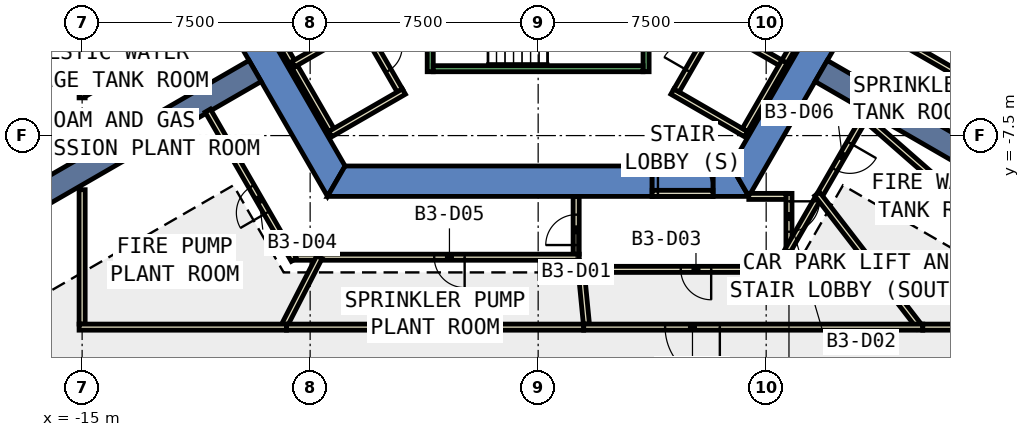
"""IFC4 building model, lengths in metres.
Left out: names, types, materials, properties, quantities, classifications, styles, units other than length and angle.
Written with IfcOpenShell. Run it as: python <this file> out.ifc"""

import sys

from ifc_helpers import new_model, si_unit, direction, frame, frame_2d, origin, place, context, subcontext, project, spatial, polyline, rectangle, outline, extrude, element, fill, save


model = new_model("IFC4")
c1 = context("Model", 3, precision=1e-05, world=origin(), true_north=direction((0.0, 1.0)))
c2 = subcontext(c1, "Body", "Model", "MODEL_VIEW")
j1 = project(units=[si_unit("LENGTHUNIT", "METRE"), si_unit("PLANEANGLEUNIT", "RADIAN")], contexts=[c1])
p1 = place(None, origin())
s1 = spatial("IfcSite", under=j1, at=p1, CompositionType="ELEMENT")
p2 = place(p1, origin())
s2 = spatial("IfcBuilding", under=s1, at=p2, CompositionType="ELEMENT")
p3 = place(p2, frame((0.0, 0.0, -16.5)))
s3 = spatial("IfcBuildingStorey", under=s2, at=p3, CompositionType="ELEMENT", Elevation=-16.5)
p4 = place(p3, origin())
e1 = element("IfcWall", 1, at=p4, inside=s3, PredefinedType="SHEAR", context=c2, shape_type="SweptSolid", body=[
    extrude(outline(polyline([(-13.856, 2.5), (-6.928, -9.5), (-6.351, -8.5), (-12.702, 2.5), (-13.856, 2.5)])), origin(), (0.0, 0.0, 1.0), 5.08),
])
p5 = place(p3, origin())
e2 = element("IfcWall", 2, at=p5, inside=s3, PredefinedType="SHEAR", context=c2, shape_type="SweptSolid", body=[
    extrude(outline(polyline([(3.75, -9.5), (3.75, -8.5), (-6.351, -8.5), (-6.928, -9.5), (3.75, -9.5)])), origin(), (0.0, 0.0, 1.0), 5.08),
])
p6 = place(p3, origin())
e3 = element("IfcWall", 3, at=p6, inside=s3, PredefinedType="SHEAR", context=c2, shape_type="SweptSolid", body=[
    extrude(outline(polyline([(5.75, -8.5), (5.75, -9.5), (6.928, -9.5), (6.351, -8.5), (5.75, -8.5)])), origin(), (0.0, 0.0, 1.0), 5.08),
])
p7 = place(p3, frame((0.0, 0.0, 3.6)))
e4 = element("IfcWall", 4, at=p7, inside=s3, PredefinedType="SHEAR", context=c2, shape_type="SweptSolid", body=[
    extrude(outline(polyline([(5.75, -9.5), (5.75, -8.5), (3.75, -8.5), (3.75, -9.5), (5.75, -9.5)])), origin(), (0.0, 0.0, 1.0), 1.48),
])
p8 = place(p3, origin())
e5 = element("IfcWall", 5, at=p8, inside=s3, PredefinedType="SHEAR", context=c2, shape_type="SweptSolid", body=[
    extrude(outline(polyline([(6.928, -9.5), (13.856, 2.5), (12.702, 2.5), (6.351, -8.5), (6.928, -9.5)])), origin(), (0.0, 0.0, 1.0), 5.08),
])
for number, where, z_axis, x_axis in (
    (6, (9.31, -5.375, 0.0), (0.0, 0.0, 1.0), (0.866, -0.5, 0.0)),
    (7, (-9.31, -5.375, 0.0), (0.0, 0.0, 1.0), (-0.866, -0.5, 0.0)),
):
    element("IfcWall", number, at=place(p3, frame(where, z_axis=z_axis, x_axis=x_axis)), inside=s3, PredefinedType="SHEAR", context=c2, shape_type="SweptSolid", body=[
        extrude(rectangle(XDim=9.0, YDim=0.8, at=frame_2d((4.5, 0.0))), origin(), (0.0, 0.0, 1.0), 5.08),
    ])
p9 = place(p3, frame((1.25, -11.4, 0.0), z_axis=(0.0, 0.0, 1.0), x_axis=(0.0, 1.0, 0.0)))
e8 = element("IfcWall", 8, at=p9, inside=s3, PredefinedType="PARTITIONING", context=c2, shape_type="SweptSolid", body=[
    extrude(rectangle(XDim=1.9, YDim=0.2, at=frame_2d((0.95, 0.0))), origin(), (0.0, 0.0, 1.0), 5.08),
])
p10 = place(p9, frame((0.3, 0.0, 0.0)))
e9 = element("IfcOpeningElement", 9, at=p10, cuts=e8, PredefinedType="OPENING", context=c2, shape_type="SweptSolid", body=[
    extrude(rectangle(XDim=1.0, YDim=2.1, at=frame_2d((0.5, 1.05))), frame((0.0, 0.11, 0.0), z_axis=(0.0, -1.0, 0.0), x_axis=(1.0, 0.0, 0.0)), (0.0, 0.0, 1.0), 0.22),
])
p11 = place(p3, frame((8.25, -9.4, 0.0), z_axis=(0.0, 0.0, 1.0), x_axis=(0.0, -1.0, 0.0)))
e10 = element("IfcWall", 10, at=p11, inside=s3, PredefinedType="PARTITIONING", context=c2, shape_type="SweptSolid", body=[
    extrude(rectangle(XDim=1.71, YDim=0.2, at=frame_2d((0.855, 0.0))), origin(), (0.0, 0.0, 1.0), 5.08),
])
p12 = place(p11, frame((0.262, 0.0, 0.0)))
e11 = element("IfcOpeningElement", 11, at=p12, cuts=e10, PredefinedType="OPENING", context=c2, shape_type="SweptSolid", body=[
    extrude(rectangle(XDim=1.0, YDim=2.1, at=frame_2d((0.5, 1.05))), frame((0.0, 0.11, 0.0), z_axis=(0.0, -1.0, 0.0), x_axis=(1.0, 0.0, 0.0)), (0.0, 0.0, 1.0), 0.22),
])
p13 = place(p3, frame((6.928, -9.5, 0.0), z_axis=(0.0, 0.0, 1.0), x_axis=(1.0, 0.0, 0.0)))
e12 = element("IfcWall", 12, at=p13, inside=s3, PredefinedType="PARTITIONING", context=c2, shape_type="SweptSolid", body=[
    extrude(rectangle(XDim=1.222, YDim=0.2, at=frame_2d((0.611, 0.0))), origin(), (0.0, 0.0, 1.0), 5.08),
])
p14 = place(p3, frame((8.25, -11.31, 0.0), z_axis=(0.0, 0.0, 1.0), x_axis=(0.0, -1.0, 0.0)))
e13 = element("IfcWall", 13, at=p14, inside=s3, PredefinedType="PARTITIONING", context=c2, shape_type="SweptSolid", body=[
    extrude(rectangle(XDim=0.49, YDim=0.2, at=frame_2d((0.245, 0.0))), origin(), (0.0, 0.0, 1.0), 5.08),
])
p15 = place(p3, frame((8.35, -11.9, 0.0), z_axis=(0.0, 0.0, 1.0), x_axis=(-1.0, 0.0, 0.0)))
e14 = element("IfcWall", 14, at=p15, inside=s3, PredefinedType="PARTITIONING", context=c2, shape_type="SweptSolid", body=[
    extrude(rectangle(XDim=7.039, YDim=0.2, at=frame_2d((3.52, 0.0))), origin(), (0.0, 0.0, 1.0), 5.08),
])
p16 = place(p15, frame((2.659, 0.0, 0.0)))
e15 = element("IfcOpeningElement", 15, at=p16, cuts=e14, PredefinedType="OPENING", context=c2, shape_type="SweptSolid", body=[
    extrude(rectangle(XDim=1.0, YDim=2.1, at=frame_2d((0.5, 1.05))), frame((0.0, 0.11, 0.0), z_axis=(0.0, -1.0, 0.0), x_axis=(1.0, 0.0, 0.0)), (0.0, 0.0, 1.0), 0.22),
])
p17 = place(p3, frame((1.25, -12.0, 0.0), z_axis=(0.0, 0.0, 1.0), x_axis=(0.0, 1.0, 0.0)))
e16 = element("IfcWall", 16, at=p17, inside=s3, PredefinedType="PARTITIONING", context=c2, shape_type="SweptSolid", body=[
    extrude(rectangle(XDim=0.4, YDim=0.2, at=frame_2d((0.2, 0.0))), origin(), (0.0, 0.0, 1.0), 5.08),
])
p18 = place(p3, frame((-7.296, -11.5, 0.0), z_axis=(0.0, 0.0, 1.0), x_axis=(-1.0, 0.0, 0.0)))
e17 = element("IfcWall", 17, at=p18, inside=s3, PredefinedType="PARTITIONING", context=c2, shape_type="SweptSolid", body=[
    extrude(rectangle(XDim=0.687, YDim=0.2, at=frame_2d((0.344, 0.0))), origin(), (0.0, 0.0, 1.0), 5.08),
])
p19 = place(p3, frame((-8.033, -11.587, 0.0), z_axis=(0.0, 0.0, 1.0), x_axis=(-0.499974742752, 0.866039985572, 0.0)))
e18 = element("IfcWall", 18, at=p19, inside=s3, PredefinedType="PARTITIONING", context=c2, shape_type="SweptSolid", body=[
    extrude(rectangle(XDim=5.668, YDim=0.2, at=frame_2d((2.834, 0.0))), origin(), (0.0, 0.0, 1.0), 5.08),
])
p20 = place(p19, frame((1.788, 0.0, 0.0)))
e19 = element("IfcOpeningElement", 19, at=p20, cuts=e18, PredefinedType="OPENING", context=c2, shape_type="SweptSolid", body=[
    extrude(rectangle(XDim=1.0, YDim=2.1, at=frame_2d((0.5, 1.05))), frame((0.0, 0.11, 0.0), z_axis=(0.0, -1.0, 0.0), x_axis=(1.0, 0.0, 0.0)), (0.0, 0.0, 1.0), 0.22),
])
p21 = place(p3, frame((1.35, -11.5, 0.0), z_axis=(0.0, 0.0, 1.0), x_axis=(-1.0, 0.0, 0.0)))
e20 = element("IfcWall", 20, at=p21, inside=s3, PredefinedType="PARTITIONING", context=c2, shape_type="SweptSolid", body=[
    extrude(rectangle(XDim=8.646, YDim=0.2, at=frame_2d((4.323, 0.0))), origin(), (0.0, 0.0, 1.0), 5.08),
])
p22 = place(p21, frame((3.768, 0.0, 0.0)))
e21 = element("IfcOpeningElement", 21, at=p22, cuts=e20, PredefinedType="OPENING", context=c2, shape_type="SweptSolid", body=[
    extrude(rectangle(XDim=1.0, YDim=2.1, at=frame_2d((0.5, 1.05))), frame((0.0, 0.11, 0.0), z_axis=(0.0, -1.0, 0.0), x_axis=(1.0, 0.0, 0.0)), (0.0, 0.0, 1.0), 0.22),
])
p23 = place(p3, frame((9.238, -9.498, 0.0), z_axis=(0.0, 0.0, 1.0), x_axis=(-0.499780113518, -0.866152318089, 0.0)))
e22 = element("IfcWall", 22, at=p23, inside=s3, PredefinedType="PARTITIONING", context=c2, shape_type="SweptSolid", body=[
    extrude(rectangle(XDim=2.077, YDim=0.2, at=frame_2d((1.039, 0.0))), origin(), (0.0, 0.0, 1.0), 5.08),
])
p24 = place(p3, frame((10.738, -6.901, 0.0), z_axis=(0.0, 0.0, 1.0), x_axis=(-0.500131122175, -0.865949687125, 0.0)))
e23 = element("IfcWall", 23, at=p24, inside=s3, PredefinedType="PARTITIONING", context=c2, shape_type="SweptSolid", body=[
    extrude(rectangle(XDim=2.999, YDim=0.2, at=frame_2d((1.5, 0.0))), origin(), (0.0, 0.0, 1.0), 5.08),
])
p25 = place(p24, frame((0.972, 0.0, 0.0)))
e24 = element("IfcOpeningElement", 24, at=p25, cuts=e23, PredefinedType="OPENING", context=c2, shape_type="SweptSolid", body=[
    extrude(rectangle(XDim=1.0, YDim=2.1, at=frame_2d((0.5, 1.05))), frame((0.0, 0.11, 0.0), z_axis=(0.0, -1.0, 0.0), x_axis=(1.0, 0.0, 0.0)), (0.0, 0.0, 1.0), 0.22),
])
p26 = place(p3, frame((1.587, -13.7, 0.0), z_axis=(0.0, 0.0, 1.0), x_axis=(-0.097324991698, 0.99525265435, 0.0)))
e25 = element("IfcWall", 25, at=p26, inside=s3, PredefinedType="PARTITIONING", context=c2, shape_type="SweptSolid", body=[
    extrude(rectangle(XDim=1.809, YDim=0.2, at=frame_2d((0.904, 0.0))), origin(), (0.0, 0.0, 1.0), 5.08),
])
p27 = place(p3, frame((9.177, -9.419, 0.0), z_axis=(0.0, 0.0, 1.0), x_axis=(0.610158732695, -0.792279193792, 0.0)))
e26 = element("IfcWall", 26, at=p27, inside=s3, PredefinedType="PARTITIONING", context=c2, shape_type="SweptSolid", body=[
    extrude(rectangle(XDim=5.53, YDim=0.2, at=frame_2d((2.765, 0.0))), origin(), (0.0, 0.0, 1.0), 5.08),
])
p28 = place(p3, frame((12.651, -13.8, 0.0), z_axis=(0.0, 0.0, 1.0), x_axis=(-1.0, 0.0, 0.0)))
e27 = element("IfcWall", 27, at=p28, inside=s3, PredefinedType="PARTITIONING", context=c2, shape_type="SweptSolid", body=[
    extrude(rectangle(XDim=11.154, YDim=0.2, at=frame_2d((5.577, 0.0))), origin(), (0.0, 0.0, 1.0), 5.08),
])
p29 = place(p28, frame((6.675, 0.0, 0.0)))
e28 = element("IfcOpeningElement", 28, at=p29, cuts=e27, PredefinedType="OPENING", context=c2, shape_type="SweptSolid", body=[
    extrude(rectangle(XDim=1.8, YDim=2.1, at=frame_2d((0.9, 1.05))), frame((0.0, 0.11, 0.0), z_axis=(0.0, -1.0, 0.0), x_axis=(1.0, 0.0, 0.0)), (0.0, 0.0, 1.0), 0.22),
])
p30 = place(p3, frame((-7.196, -11.5, 0.0), z_axis=(0.0, 0.0, 1.0), x_axis=(-0.457008432814, -0.889462361394, 0.0)))
e29 = element("IfcWall", 29, at=p30, inside=s3, PredefinedType="PARTITIONING", context=c2, shape_type="SweptSolid", body=[
    extrude(rectangle(XDim=2.486, YDim=0.2, at=frame_2d((1.243, 0.0))), origin(), (0.0, 0.0, 1.0), 5.08),
])
p31 = place(p3, frame((-15.0, -13.7, 0.0), z_axis=(0.0, 0.0, 1.0), x_axis=(0.0, 1.0, 0.0)))
e30 = element("IfcWall", 30, at=p31, inside=s3, PredefinedType="PARTITIONING", context=c2, shape_type="SweptSolid", body=[
    extrude(rectangle(XDim=4.42, YDim=0.2, at=frame_2d((2.21, 0.0))), origin(), (0.0, 0.0, 1.0), 5.08),
])
p32 = place(p3, frame((-8.278, -13.8, 0.0), z_axis=(0.0, 0.0, 1.0), x_axis=(-1.0, 0.0, 0.0)))
e31 = element("IfcWall", 31, at=p32, inside=s3, PredefinedType="PARTITIONING", context=c2, shape_type="SweptSolid", body=[
    extrude(rectangle(XDim=6.822, YDim=0.2, at=frame_2d((3.411, 0.0))), origin(), (0.0, 0.0, 1.0), 5.08),
])
p33 = place(p3, frame((1.497, -13.8, 0.0), z_axis=(0.0, 0.0, 1.0), x_axis=(-1.0, 0.0, 0.0)))
e32 = element("IfcWall", 32, at=p33, inside=s3, PredefinedType="PARTITIONING", context=c2, shape_type="SweptSolid", body=[
    extrude(rectangle(XDim=9.775, YDim=0.2, at=frame_2d((4.888, 0.0))), origin(), (0.0, 0.0, 1.0), 5.08),
])
p34 = place(p3, frame((14.9, -13.8, 0.0), z_axis=(0.0, 0.0, 1.0), x_axis=(-1.0, 0.0, 0.0)))
e33 = element("IfcWall", 33, at=p34, inside=s3, PredefinedType="PARTITIONING", context=c2, shape_type="SweptSolid", body=[
    extrude(rectangle(XDim=2.249, YDim=0.2, at=frame_2d((1.125, 0.0))), origin(), (0.0, 0.0, 1.0), 5.08),
])
p35 = place(p3, frame((10.663, -6.835, 0.0), z_axis=(0.0, 0.0, 1.0), x_axis=(0.752269740493, -0.658855247788, 0.0)))
e34 = element("IfcWall", 34, at=p35, inside=s3, PredefinedType="PARTITIONING", context=c2, shape_type="SweptSolid", body=[
    extrude(rectangle(XDim=5.865, YDim=0.2, at=frame_2d((2.932, 0.0))), origin(), (0.0, 0.0, 1.0), 5.08),
])
p36 = place(p3, frame((12.124, -4.5, 0.0), z_axis=(0.0, 0.0, 1.0), x_axis=(0.866109535743, -0.499854250852, 0.0)))
e35 = element("IfcWall", 35, at=p36, inside=s3, PredefinedType="PARTITIONING", context=c2, shape_type="SweptSolid", body=[
    extrude(rectangle(XDim=3.421, YDim=0.2, at=frame_2d((1.71, 0.0))), origin(), (0.0, 0.0, 1.0), 5.08),
])
p37 = place(p3, frame((-12.037, -4.45, 0.0), z_axis=(0.0, 0.0, 1.0), x_axis=(-0.866063163075, -0.499934593286, 0.0)))
e36 = element("IfcWall", 36, at=p37, inside=s3, PredefinedType="PARTITIONING", context=c2, shape_type="SweptSolid", body=[
    extrude(rectangle(XDim=3.321, YDim=0.2, at=frame_2d((1.66, 0.0))), origin(), (0.0, 0.0, 1.0), 5.08),
])
p38 = place(p3, frame((-15.0, -6.26, 0.0), z_axis=(0.0, 0.0, 1.0), x_axis=(0.0, 1.0, 0.0)))
e37 = element("IfcWall", 37, at=p38, inside=s3, PredefinedType="PARTITIONING", context=c2, shape_type="SweptSolid", body=[
    extrude(rectangle(XDim=3.554, YDim=0.2, at=frame_2d((1.777, 0.0))), origin(), (0.0, 0.0, 1.0), 5.08),
])
p39 = place(p3, frame((6.84, -7.453, 0.0), z_axis=(0.0, 0.0, 1.0), x_axis=(-0.866056369097, 0.49994636267, 0.0)))
e38 = element("IfcWall", 38, at=p39, inside=s3, PredefinedType="PARTITIONING", context=c2, shape_type="SweptSolid", body=[
    extrude(rectangle(XDim=2.8, YDim=0.2, at=frame_2d((1.4, 0.0))), origin(), (0.0, 0.0, 1.0), 5.08),
])
p40 = place(p3, frame((4.551, -6.017, 0.0), z_axis=(0.0, 0.0, 1.0), x_axis=(0.499925626596, 0.866068339032, 0.0)))
e39 = element("IfcWall", 39, at=p40, inside=s3, PredefinedType="PARTITIONING", context=c2, shape_type="SweptSolid", body=[
    extrude(rectangle(XDim=2.601, YDim=0.2, at=frame_2d((1.3, 0.0))), origin(), (0.0, 0.0, 1.0), 5.08),
])
p41 = place(p40, frame((0.75, 0.0, 0.0)))
e40 = element("IfcOpeningElement", 40, at=p41, cuts=e39, PredefinedType="OPENING", context=c2, shape_type="SweptSolid", body=[
    extrude(rectangle(XDim=0.9, YDim=2.1, at=frame_2d((0.45, 1.05))), frame((0.0, 0.11, 0.0), z_axis=(0.0, -1.0, 0.0), x_axis=(1.0, 0.0, 0.0)), (0.0, 0.0, 1.0), 0.22),
])
p42 = place(p3, frame((5.888, -3.902, 0.0), z_axis=(0.0, 0.0, 1.0), x_axis=(0.866022959057, -0.500004234368, 0.0)))
e41 = element("IfcWall", 41, at=p42, inside=s3, PredefinedType="PARTITIONING", context=c2, shape_type="SweptSolid", body=[
    extrude(rectangle(XDim=2.5, YDim=0.2, at=frame_2d((1.25, 0.0))), origin(), (0.0, 0.0, 1.0), 5.08),
])
p43 = place(p3, frame((8.103, -5.065, 0.0), z_axis=(0.0, 0.0, 1.0), x_axis=(-0.49996627774, -0.866044872465, 0.0)))
e42 = element("IfcWall", 42, at=p43, inside=s3, PredefinedType="PARTITIONING", context=c2, shape_type="SweptSolid", body=[
    extrude(rectangle(XDim=2.6, YDim=0.2, at=frame_2d((1.3, 0.0))), origin(), (0.0, 0.0, 1.0), 5.08),
])
p44 = place(p3, frame((10.703, -0.562, 0.0), z_axis=(0.0, 0.0, 1.0), x_axis=(-0.500012382935, -0.866018254376, 0.0)))
e43 = element("IfcWall", 43, at=p44, inside=s3, PredefinedType="PARTITIONING", context=c2, shape_type="SweptSolid", body=[
    extrude(rectangle(XDim=5.199, YDim=0.2, at=frame_2d((2.6, 0.0))), origin(), (0.0, 0.0, 1.0), 5.08),
])
p45 = place(p3, frame((-8.003, -5.238, 0.0), z_axis=(0.0, 0.0, 1.0), x_axis=(-0.500047596559, 0.865997922154, 0.0)))
e44 = element("IfcWall", 44, at=p45, inside=s3, PredefinedType="PARTITIONING", context=c2, shape_type="SweptSolid", body=[
    extrude(rectangle(XDim=5.2, YDim=0.2, at=frame_2d((2.6, 0.0))), origin(), (0.0, 0.0, 1.0), 5.08),
])
p46 = place(p3, frame((-6.803, -7.317, 0.0), z_axis=(0.0, 0.0, 1.0), x_axis=(-0.499913221443, 0.866075499611, 0.0)))
e45 = element("IfcWall", 45, at=p46, inside=s3, PredefinedType="PARTITIONING", context=c2, shape_type="SweptSolid", body=[
    extrude(rectangle(XDim=2.4, YDim=0.2, at=frame_2d((1.2, 0.0))), origin(), (0.0, 0.0, 1.0), 5.08),
])
p47 = place(p3, frame((-8.053, -5.151, 0.0), z_axis=(0.0, 0.0, 1.0), x_axis=(0.866234368172, 0.499637888272, 0.0)))
e46 = element("IfcWall", 46, at=p47, inside=s3, PredefinedType="PARTITIONING", context=c2, shape_type="SweptSolid", body=[
    extrude(rectangle(XDim=2.499, YDim=0.2, at=frame_2d((1.25, 0.0))), origin(), (0.0, 0.0, 1.0), 5.08),
])
p48 = place(p3, frame((-5.851, -3.765, 0.0), z_axis=(0.0, 0.0, 1.0), x_axis=(0.499925626596, -0.866068339032, 0.0)))
e47 = element("IfcWall", 47, at=p48, inside=s3, PredefinedType="PARTITIONING", context=c2, shape_type="SweptSolid", body=[
    extrude(rectangle(XDim=2.601, YDim=0.2, at=frame_2d((1.3, 0.0))), origin(), (0.0, 0.0, 1.0), 5.08),
])
p49 = place(p48, frame((0.95, 0.0, 0.0)))
e48 = element("IfcOpeningElement", 48, at=p49, cuts=e47, PredefinedType="OPENING", context=c2, shape_type="SweptSolid", body=[
    extrude(rectangle(XDim=0.9, YDim=2.1, at=frame_2d((0.45, 1.05))), frame((0.0, 0.11, 0.0), z_axis=(0.0, -1.0, 0.0), x_axis=(1.0, 0.0, 0.0)), (0.0, 0.0, 1.0), 0.22),
])
p50 = place(p3, frame((-4.415, -6.053, 0.0), z_axis=(0.0, 0.0, 1.0), x_axis=(-0.866056369097, -0.49994636267, 0.0)))
e49 = element("IfcWall", 49, at=p50, inside=s3, PredefinedType="PARTITIONING", context=c2, shape_type="SweptSolid", body=[
    extrude(rectangle(XDim=2.8, YDim=0.2, at=frame_2d((1.4, 0.0))), origin(), (0.0, 0.0, 1.0), 5.08),
])
p51 = place(p3, frame((3.75, -9.4, 0.0), z_axis=(0.0, 0.0, 1.0), x_axis=(1.0, 0.0, 0.0)))
e50 = element("IfcWall", 50, at=p51, inside=s3, PredefinedType="PARTITIONING", context=c2, shape_type="SweptSolid", body=[
    extrude(rectangle(XDim=2.0, YDim=0.2, at=frame_2d((1.0, 0.0))), origin(), (0.0, 0.0, 1.0), 2.4),
])
p52 = place(p51, frame((0.19, 0.0, 0.0)))
e51 = element("IfcOpeningElement", 51, at=p52, cuts=e50, PredefinedType="OPENING", context=c2, shape_type="SweptSolid", body=[
    extrude(rectangle(XDim=1.8, YDim=2.1, at=frame_2d((0.9, 1.05))), frame((0.0, 0.11, 0.0), z_axis=(0.0, -1.0, 0.0), x_axis=(1.0, 0.0, 0.0)), (0.0, 0.0, 1.0), 0.22),
])
p53 = place(p3, frame((-3.55, -1.0, 0.0), z_axis=(0.0, 0.0, 1.0), x_axis=(0.0, -1.0, 0.0)))
e52 = element("IfcWall", 52, at=p53, inside=s3, PredefinedType="STANDARD", context=c2, shape_type="SweptSolid", body=[
    extrude(rectangle(XDim=4.4, YDim=0.2, at=frame_2d((2.2, 0.0))), origin(), (0.0, 0.0, 1.0), 5.08),
])
p54 = place(p53, frame((1.65, 0.0, 0.0)))
e53 = element("IfcOpeningElement", 53, at=p54, cuts=e52, PredefinedType="OPENING", context=c2, shape_type="SweptSolid", body=[
    extrude(rectangle(XDim=1.1, YDim=2.2, at=frame_2d((0.55, 1.1))), frame((0.0, 0.11, 0.0), z_axis=(0.0, -1.0, 0.0), x_axis=(1.0, 0.0, 0.0)), (0.0, 0.0, 1.0), 0.22),
])
p55 = place(p3, frame((3.55, -2.667, 0.0), z_axis=(0.0, 0.0, 1.0), x_axis=(0.0, -1.0, 0.0)))
e54 = element("IfcWall", 54, at=p55, inside=s3, PredefinedType="STANDARD", context=c2, shape_type="SweptSolid", body=[
    extrude(rectangle(XDim=2.733, YDim=0.2, at=frame_2d((1.366, 0.0))), origin(), (0.0, 0.0, 1.0), 5.08),
])
p56 = place(p3, frame((-3.45, -5.3, 0.0), z_axis=(0.0, 0.0, 1.0), x_axis=(1.0, 0.0, 0.0)))
e55 = element("IfcWall", 55, at=p56, inside=s3, PredefinedType="STANDARD", context=c2, shape_type="SweptSolid", body=[
    extrude(rectangle(XDim=6.9, YDim=0.2, at=frame_2d((3.45, 0.0))), origin(), (0.0, 0.0, 1.0), 5.08),
])
p57 = place(p10, origin())
e56 = element("IfcDoor", 56, at=p57, inside=s3, OperationType="SINGLE_SWING_LEFT", PredefinedType="DOOR", context=c2, shape_type="SweptSolid", body=[
    extrude(rectangle(XDim=1.0, YDim=2.1, at=frame_2d((0.5, 1.05))), frame((0.0, 0.025, 0.0), z_axis=(0.0, -1.0, 0.0), x_axis=(1.0, 0.0, 0.0)), (0.0, 0.0, 1.0), 0.05),
])
fill(e9, e56)
p58 = place(p12, origin())
e57 = element("IfcDoor", 57, at=p58, inside=s3, OperationType="SINGLE_SWING_RIGHT", PredefinedType="DOOR", context=c2, shape_type="SweptSolid", body=[
    extrude(rectangle(XDim=1.0, YDim=2.1, at=frame_2d((0.5, 1.05))), frame((0.0, 0.025, 0.0), z_axis=(0.0, -1.0, 0.0), x_axis=(1.0, 0.0, 0.0)), (0.0, 0.0, 1.0), 0.05),
])
fill(e11, e57)
p59 = place(p16, origin())
e58 = element("IfcDoor", 58, at=p59, inside=s3, OperationType="SINGLE_SWING_LEFT", PredefinedType="DOOR", context=c2, shape_type="SweptSolid", body=[
    extrude(rectangle(XDim=1.0, YDim=2.1, at=frame_2d((0.5, 1.05))), frame((0.0, 0.025, 0.0), z_axis=(0.0, -1.0, 0.0), x_axis=(1.0, 0.0, 0.0)), (0.0, 0.0, 1.0), 0.05),
])
fill(e15, e58)
p60 = place(p20, origin())
e59 = element("IfcDoor", 59, at=p60, inside=s3, OperationType="SINGLE_SWING_RIGHT", PredefinedType="DOOR", context=c2, shape_type="SweptSolid", body=[
    extrude(rectangle(XDim=1.0, YDim=2.1, at=frame_2d((0.5, 1.05))), frame((0.0, 0.025, 0.0), z_axis=(0.0, -1.0, 0.0), x_axis=(1.0, 0.0, 0.0)), (0.0, 0.0, 1.0), 0.05),
])
fill(e19, e59)
p61 = place(p22, origin())
e60 = element("IfcDoor", 60, at=p61, inside=s3, OperationType="SINGLE_SWING_LEFT", PredefinedType="DOOR", context=c2, shape_type="SweptSolid", body=[
    extrude(rectangle(XDim=1.0, YDim=2.1, at=frame_2d((0.5, 1.05))), frame((0.0, 0.025, 0.0), z_axis=(0.0, -1.0, 0.0), x_axis=(1.0, 0.0, 0.0)), (0.0, 0.0, 1.0), 0.05),
])
fill(e21, e60)
p62 = place(p25, origin())
e61 = element("IfcDoor", 61, at=p62, inside=s3, OperationType="SINGLE_SWING_RIGHT", PredefinedType="DOOR", context=c2, shape_type="SweptSolid", body=[
    extrude(rectangle(XDim=1.0, YDim=2.1, at=frame_2d((0.5, 1.05))), frame((0.0, 0.025, 0.0), z_axis=(0.0, -1.0, 0.0), x_axis=(1.0, 0.0, 0.0)), (0.0, 0.0, 1.0), 0.05),
])
fill(e24, e61)
p63 = place(p29, origin())
e62 = element("IfcDoor", 62, at=p63, inside=s3, OperationType="DOUBLE_DOOR_SINGLE_SWING", PredefinedType="DOOR", context=c2, shape_type="SweptSolid", body=[
    extrude(rectangle(XDim=1.8, YDim=2.1, at=frame_2d((0.9, 1.05))), frame((0.0, 0.025, 0.0), z_axis=(0.0, -1.0, 0.0), x_axis=(1.0, 0.0, 0.0)), (0.0, 0.0, 1.0), 0.05),
])
fill(e28, e62)
p64 = place(p41, origin())
e63 = element("IfcDoor", 63, at=p64, inside=s3, OperationType="SINGLE_SWING_RIGHT", PredefinedType="DOOR", context=c2, shape_type="SweptSolid", body=[
    extrude(rectangle(XDim=0.9, YDim=2.1, at=frame_2d((0.45, 1.05))), frame((0.0, 0.025, 0.0), z_axis=(0.0, -1.0, 0.0), x_axis=(1.0, 0.0, 0.0)), (0.0, 0.0, 1.0), 0.05),
])
fill(e40, e63)
p65 = place(p49, origin())
e64 = element("IfcDoor", 64, at=p65, inside=s3, OperationType="SINGLE_SWING_LEFT", PredefinedType="DOOR", context=c2, shape_type="SweptSolid", body=[
    extrude(rectangle(XDim=0.9, YDim=2.1, at=frame_2d((0.45, 1.05))), frame((0.0, 0.025, 0.0), z_axis=(0.0, -1.0, 0.0), x_axis=(1.0, 0.0, 0.0)), (0.0, 0.0, 1.0), 0.05),
])
fill(e48, e64)
p66 = place(p52, origin())
e65 = element("IfcDoor", 65, at=p66, inside=s3, OperationType="DOUBLE_DOOR_SINGLE_SWING", PredefinedType="DOOR", context=c2, shape_type="SweptSolid", body=[
    extrude(rectangle(XDim=1.8, YDim=2.1, at=frame_2d((0.9, 1.05))), frame((0.0, 0.025, 0.0), z_axis=(0.0, -1.0, 0.0), x_axis=(1.0, 0.0, 0.0)), (0.0, 0.0, 1.0), 0.05),
])
fill(e51, e65)
save(model, sys.argv[1])
